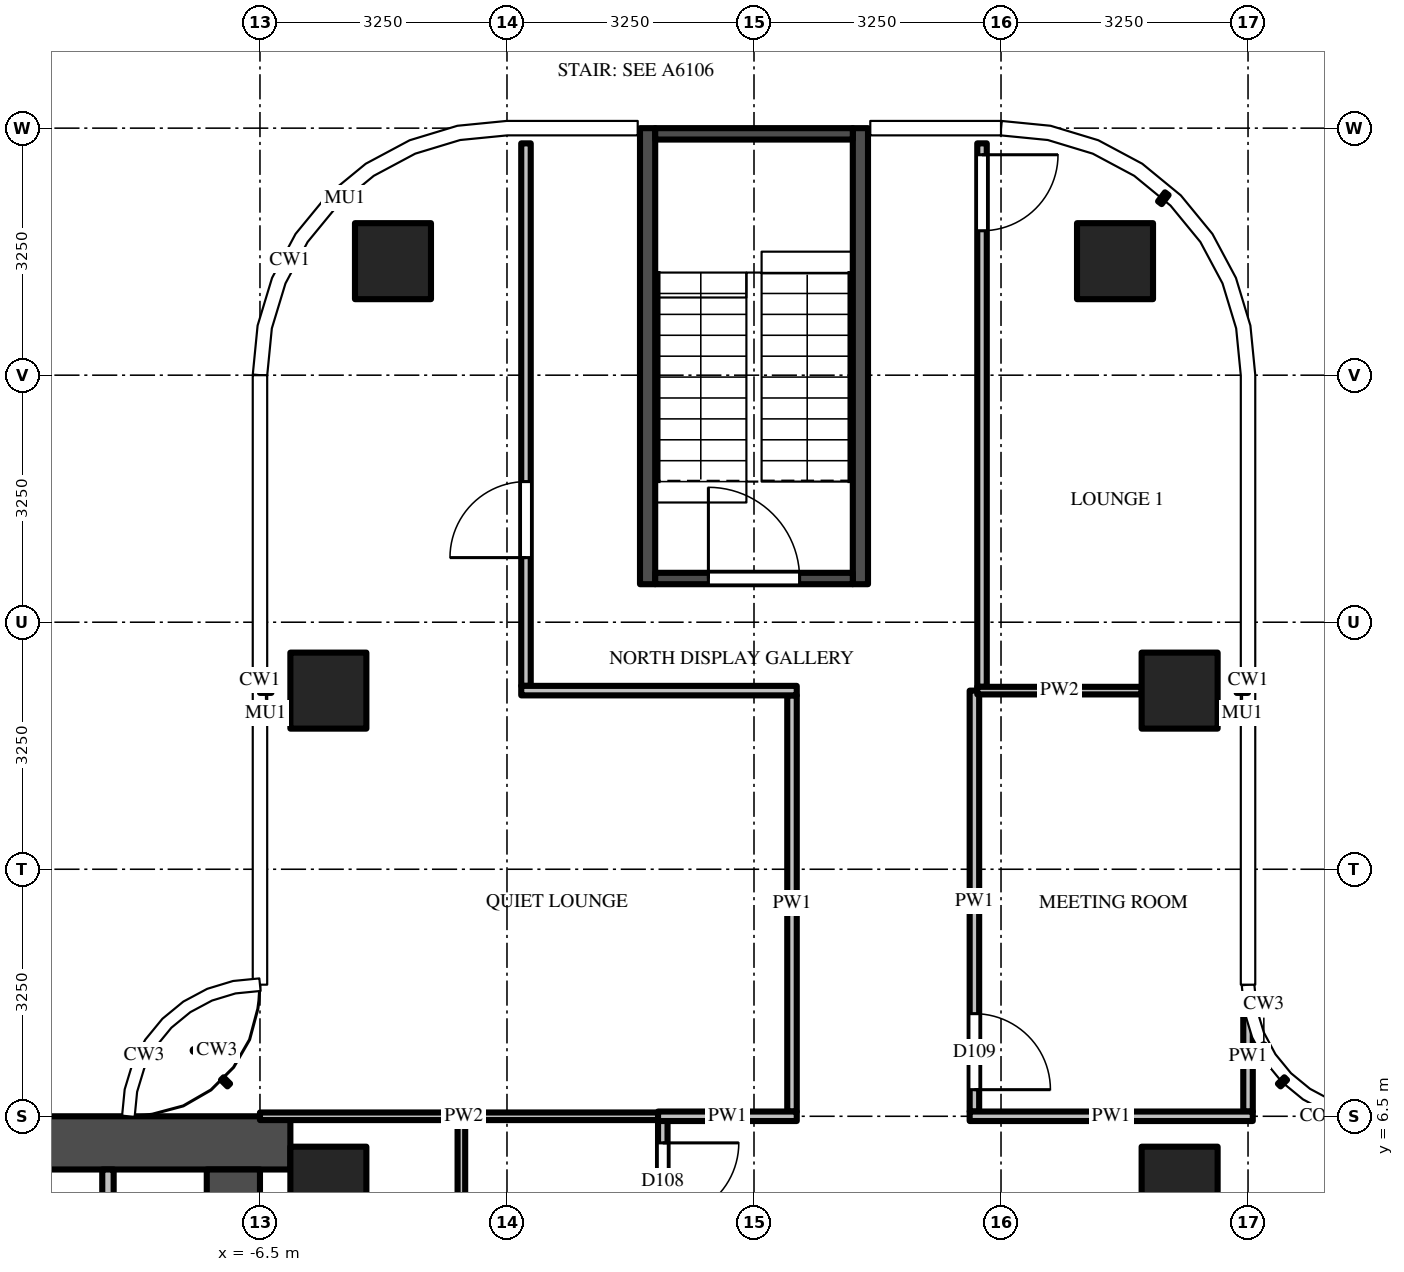
"""IFC4 building model, lengths in metres.
Left out: names, types, materials, properties, quantities, classifications, styles, units other than length and angle.
Written with IfcOpenShell. Run it as: python <this file> out.ifc"""

import sys

from ifc_helpers import new_model, si_unit, direction, frame, frame_2d, origin, origin_2d, place, context, subcontext, project, spatial, polyline, rectangle, outline, extrude, source, transform, mapped, element, fill, save


model = new_model("IFC4")
c1 = context("Model", 3, precision=1e-05, world=origin(), true_north=direction((0.0, 1.0)))
c2 = subcontext(c1, "Body", "Model", "MODEL_VIEW")
j1 = project(units=[si_unit("LENGTHUNIT", "METRE"), si_unit("PLANEANGLEUNIT", "RADIAN")], contexts=[c1])
p1 = place(None, origin())
s1 = spatial("IfcSite", under=j1, at=p1, CompositionType="ELEMENT")
p2 = place(p1, origin())
s2 = spatial("IfcBuilding", under=s1, at=p2, CompositionType="ELEMENT")
p3 = place(p2, frame((0.0, 0.0, 314.5)))
s3 = spatial("IfcBuildingStorey", under=s2, at=p3, CompositionType="ELEMENT", Elevation=314.5)
m1 = source(origin(), c2, "Body", "SweptSolid", [
    extrude(rectangle(XDim=1.0, YDim=1.0, at=origin_2d()), origin(), (0.0, 0.0, 1.0), 3.9),
])
for number, where, z_axis, x_axis in (
    (1, (-5.6, 12.1, 0.0), (0.0, 0.0, 1.0), (1.0, 0.0, 0.0)),
    (2, (-4.75, 17.75, 0.0), (0.0, 0.0, 1.0), (1.0, 0.0, 0.0)),
    (3, (5.6, 12.1, 0.0), (0.0, 0.0, 1.0), (1.0, 0.0, 0.0)),
    (4, (4.75, 17.75, 0.0), (0.0, 0.0, 1.0), (1.0, 0.0, 0.0)),
    (5, (5.6, 5.6, 0.0), (0.0, 0.0, 1.0), (1.0, 0.0, 0.0)),
    (6, (-5.6, 5.6, 0.0), (0.0, 0.0, 1.0), (1.0, 0.0, 0.0)),
):
    element("IfcColumn", number, at=place(p3, frame(where, z_axis=z_axis, x_axis=x_axis)), inside=s3, PredefinedType="COLUMN", context=c2, shape_type="MappedRepresentation", body=[
        mapped(m1, transform((0.0, 0.0, 0.0))),
    ])
m2 = source(origin(), c2, "Body", "SweptSolid", [
    extrude(rectangle(XDim=16.65, YDim=0.7, at=frame_2d((8.325, 0.0))), origin(), (0.0, 0.0, 1.0), 3.7),
])
p4 = place(p3, frame((-6.1, 6.15, 0.0), z_axis=(0.0, 0.0, 1.0), x_axis=(-1.0, 0.0, 0.0)))
e7 = element("IfcWall", 7, at=p4, inside=s3, PredefinedType="SHEAR", context=c2, shape_type="MappedRepresentation", body=[
    mapped(m2, transform((0.0, 0.0, 0.0))),
])
m3 = source(origin(), c2, "Body", "SweptSolid", [
    extrude(rectangle(XDim=9.05, YDim=0.7, at=frame_2d((4.525, 0.0))), origin(), (0.0, 0.0, 1.0), 3.7),
])
p5 = place(p3, frame((-6.85, 5.8, 0.0), z_axis=(0.0, 0.0, 1.0), x_axis=(0.0, -1.0, 0.0)))
e8 = element("IfcWall", 8, at=p5, inside=s3, PredefinedType="SHEAR", context=c2, shape_type="MappedRepresentation", body=[
    mapped(m3, transform((0.0, 0.0, 0.0))),
])
m4 = source(origin(), c2, "Body", "SweptSolid", [
    extrude(rectangle(XDim=1.8, YDim=2.1, at=frame_2d((0.9, 1.05))), frame((0.0, 0.36, 0.0), z_axis=(0.0, -1.0, 0.0), x_axis=(1.0, 0.0, 0.0)), (0.0, 0.0, 1.0), 0.72),
])
p6 = place(p5, frame((3.15, 0.0, 0.0)))
e9 = element("IfcOpeningElement", 9, at=p6, cuts=e8, PredefinedType="OPENING", context=c2, shape_type="MappedRepresentation", body=[
    mapped(m4, transform((0.0, 0.0, 0.0))),
])
m5 = source(origin(), c2, "Body", "SweptSolid", [
    extrude(rectangle(XDim=2.2, YDim=0.15, at=frame_2d((1.1, 0.0))), origin(), (0.0, 0.0, 1.0), 3.7),
])
p7 = place(p3, frame((-8.5, 5.8, 0.0), z_axis=(0.0, 0.0, 1.0), x_axis=(0.0, -1.0, 0.0)))
e10 = element("IfcWall", 10, at=p7, inside=s3, PredefinedType="PARTITIONING", context=c2, shape_type="MappedRepresentation", body=[
    mapped(m5, transform((0.0, 0.0, 0.0))),
])
m6 = source(origin(), c2, "Body", "SweptSolid", [
    extrude(rectangle(XDim=6.0, YDim=0.2, at=frame_2d((3.0, 0.0))), origin(), (0.0, 0.0, 1.0), 3.7),
])
for number, where, z_axis, x_axis in (
    (11, (-1.4, 13.5, 0.0), (0.0, 0.0, 1.0), (0.0, 1.0, 0.0)),
    (12, (1.4, 13.5, 0.0), (0.0, 0.0, 1.0), (0.0, 1.0, 0.0)),
):
    element("IfcWall", number, at=place(p3, frame(where, z_axis=z_axis, x_axis=x_axis)), inside=s3, PredefinedType="SHEAR", context=c2, shape_type="MappedRepresentation", body=[
        mapped(m6, transform((0.0, 0.0, 0.0))),
    ])
m7 = source(origin(), c2, "Body", "SweptSolid", [
    extrude(rectangle(XDim=2.6, YDim=0.15, at=frame_2d((1.3, 0.0))), origin(), (0.0, 0.0, 1.0), 3.7),
])
p8 = place(p3, frame((-1.3, 13.575, 0.0), z_axis=(0.0, 0.0, 1.0), x_axis=(1.0, 0.0, 0.0)))
e13 = element("IfcWall", 13, at=p8, inside=s3, PredefinedType="SHEAR", context=c2, shape_type="MappedRepresentation", body=[
    mapped(m7, transform((0.0, 0.0, 0.0))),
])
m8 = source(origin(), c2, "Body", "SweptSolid", [
    extrude(rectangle(XDim=1.2, YDim=2.1, at=frame_2d((0.6, 1.05))), frame((0.0, 0.085, 0.0), z_axis=(0.0, -1.0, 0.0), x_axis=(1.0, 0.0, 0.0)), (0.0, 0.0, 1.0), 0.17),
])
p9 = place(p8, frame((0.7, 0.0, 0.0)))
e14 = element("IfcOpeningElement", 14, at=p9, cuts=e13, PredefinedType="OPENING", context=c2, shape_type="MappedRepresentation", body=[
    mapped(m8, transform((0.0, 0.0, 0.0))),
])
p10 = place(p3, frame((-1.3, 19.425, 0.0), z_axis=(0.0, 0.0, 1.0), x_axis=(1.0, 0.0, 0.0)))
e15 = element("IfcWall", 15, at=p10, inside=s3, PredefinedType="SHEAR", context=c2, shape_type="MappedRepresentation", body=[
    mapped(m7, transform((0.0, 0.0, 0.0))),
])
p11 = place(p3, origin())
e16 = element("IfcWall", 16, at=p11, inside=s3, PredefinedType="USERDEFINED", context=c2, shape_type="SweptSolid", body=[
    extrude(outline(polyline([(-8.799, 17.044), (-8.292, 18.616), (-7.967, 18.99), (-7.514, 18.597), (-7.758, 18.316), (-8.195, 16.963), (-8.151, 15.967), (-8.114, 15.846), (-8.686, 15.667), (-8.747, 15.862), (-8.799, 17.044)])), origin(), (0.0, 0.0, 1.0), 0.5),
])
m9 = source(origin(), c2, "Body", "SweptSolid", [
    extrude(rectangle(XDim=3.137, YDim=0.1, at=frame_2d((1.569, 0.0))), origin(), (0.0, 0.0, 1.0), 2.997),
])
p12 = place(p3, frame((-3.85, 3.312, 0.0), z_axis=(0.0, 0.0, 1.0), x_axis=(0.0, 1.0, 0.0)))
e17 = element("IfcWall", 17, at=p12, inside=s3, PredefinedType="PARTITIONING", context=c2, shape_type="MappedRepresentation", body=[
    mapped(m9, transform((0.0, 0.0, 0.0))),
])
m10 = source(origin(), c2, "Body", "SweptSolid", [
    extrude(rectangle(XDim=7.137, YDim=0.125, at=frame_2d((3.569, 0.0))), origin(), (0.0, 0.0, 1.0), 2.78),
])
p13 = place(p3, frame((-3.0, 12.163, 0.0), z_axis=(0.0, 0.0, 1.0), x_axis=(0.0, 1.0, 0.0)))
e18 = element("IfcWall", 18, at=p13, inside=s3, PredefinedType="PARTITIONING", context=c2, shape_type="MappedRepresentation", body=[
    mapped(m10, transform((0.0, 0.0, 0.0))),
])
m11 = source(origin(), c2, "Body", "SweptSolid", [
    extrude(rectangle(XDim=1.0, YDim=2.1, at=frame_2d((0.5, 1.05))), frame((0.0, 0.073, 0.0), z_axis=(0.0, -1.0, 0.0), x_axis=(1.0, 0.0, 0.0)), (0.0, 0.0, 1.0), 0.145),
])
p14 = place(p13, frame((1.688, 0.0, 0.0)))
e19 = element("IfcOpeningElement", 19, at=p14, cuts=e18, PredefinedType="OPENING", context=c2, shape_type="MappedRepresentation", body=[
    mapped(m11, transform((0.0, 0.0, 0.0))),
])
m12 = source(origin(), c2, "Body", "SweptSolid", [
    extrude(rectangle(XDim=3.137, YDim=0.125, at=frame_2d((1.569, 0.0))), origin(), (0.0, 0.0, 1.0), 2.997),
])
p15 = place(p3, frame((-1.2, 6.45, 0.0), z_axis=(0.0, 0.0, 1.0), x_axis=(0.0, -1.0, 0.0)))
e20 = element("IfcWall", 20, at=p15, inside=s3, PredefinedType="PARTITIONING", context=c2, shape_type="MappedRepresentation", body=[
    mapped(m12, transform((0.0, 0.0, 0.0))),
])
p16 = place(p15, frame((0.3, 0.0, 0.0)))
e21 = element("IfcOpeningElement", 21, at=p16, cuts=e20, PredefinedType="OPENING", context=c2, shape_type="MappedRepresentation", body=[
    mapped(m11, transform((0.0, 0.0, 0.0))),
])
m13 = source(origin(), c2, "Body", "SweptSolid", [
    extrude(rectangle(XDim=5.475, YDim=0.125, at=frame_2d((2.738, 0.0))), origin(), (0.0, 0.0, 1.0), 2.997),
])
p17 = place(p3, frame((0.5, 12.038, 0.0), z_axis=(0.0, 0.0, 1.0), x_axis=(0.0, -1.0, 0.0)))
e22 = element("IfcWall", 22, at=p17, inside=s3, PredefinedType="PARTITIONING", context=c2, shape_type="MappedRepresentation", body=[
    mapped(m13, transform((0.0, 0.0, 0.0))),
])
m14 = source(origin(), c2, "Body", "SweptSolid", [
    extrude(rectangle(XDim=5.538, YDim=0.125, at=frame_2d((2.769, 0.0))), origin(), (0.0, 0.0, 1.0), 2.997),
])
p18 = place(p3, frame((2.9, 12.1, 0.0), z_axis=(0.0, 0.0, 1.0), x_axis=(0.0, -1.0, 0.0)))
e23 = element("IfcWall", 23, at=p18, inside=s3, PredefinedType="PARTITIONING", context=c2, shape_type="MappedRepresentation", body=[
    mapped(m14, transform((0.0, 0.0, 0.0))),
])
p19 = place(p18, frame((4.25, 0.0, 0.0)))
e24 = element("IfcOpeningElement", 24, at=p19, cuts=e23, PredefinedType="OPENING", context=c2, shape_type="MappedRepresentation", body=[
    mapped(m11, transform((0.0, 0.0, 0.0))),
])
m15 = source(origin(), c2, "Body", "SweptSolid", [
    extrude(rectangle(XDim=7.15, YDim=0.125, at=frame_2d((3.575, 0.0))), origin(), (0.0, 0.0, 1.0), 2.78),
])
p20 = place(p3, frame((3.0, 19.3, 0.0), z_axis=(0.0, 0.0, 1.0), x_axis=(0.0, -1.0, 0.0)))
e25 = element("IfcWall", 25, at=p20, inside=s3, PredefinedType="PARTITIONING", context=c2, shape_type="MappedRepresentation", body=[
    mapped(m15, transform((0.0, 0.0, 0.0))),
])
p21 = place(p20, frame((0.15, 0.0, 0.0)))
e26 = element("IfcOpeningElement", 26, at=p21, cuts=e25, PredefinedType="OPENING", context=c2, shape_type="MappedRepresentation", body=[
    mapped(m11, transform((0.0, 0.0, 0.0))),
])
m16 = source(origin(), c2, "Body", "SweptSolid", [
    extrude(rectangle(XDim=1.469, YDim=0.125, at=frame_2d((0.734, 0.0))), origin(), (0.0, 0.0, 1.0), 3.7),
])
p22 = place(p3, frame((6.5, 6.562, 0.0), z_axis=(0.0, 0.0, 1.0), x_axis=(0.0, 1.0, 0.0)))
e27 = element("IfcWall", 27, at=p22, inside=s3, PredefinedType="PARTITIONING", context=c2, shape_type="MappedRepresentation", body=[
    mapped(m16, transform((0.0, 0.0, 0.0))),
])
m17 = source(origin(), c2, "Body", "SweptSolid", [
    extrude(rectangle(XDim=5.363, YDim=0.1, at=frame_2d((2.681, 0.0))), origin(), (0.0, 0.0, 1.0), 2.78),
])
p23 = place(p3, frame((-6.5, 6.5, 0.0), z_axis=(0.0, 0.0, 1.0), x_axis=(1.0, 0.0, 0.0)))
e28 = element("IfcWall", 28, at=p23, inside=s3, PredefinedType="PARTITIONING", context=c2, shape_type="MappedRepresentation", body=[
    mapped(m17, transform((0.0, 0.0, 0.0))),
])
m18 = source(origin(), c2, "Body", "SweptSolid", [
    extrude(rectangle(XDim=1.825, YDim=0.125, at=frame_2d((0.913, 0.0))), origin(), (0.0, 0.0, 1.0), 3.7),
])
p24 = place(p3, frame((-1.262, 6.5, 0.0), z_axis=(0.0, 0.0, 1.0), x_axis=(1.0, 0.0, 0.0)))
e29 = element("IfcWall", 29, at=p24, inside=s3, PredefinedType="PARTITIONING", context=c2, shape_type="MappedRepresentation", body=[
    mapped(m18, transform((0.0, 0.0, 0.0))),
])
m19 = source(origin(), c2, "Body", "SweptSolid", [
    extrude(rectangle(XDim=3.725, YDim=0.125, at=frame_2d((1.863, 0.0))), origin(), (0.0, 0.0, 1.0), 2.78),
])
p25 = place(p3, frame((2.837, 6.5, 0.0), z_axis=(0.0, 0.0, 1.0), x_axis=(1.0, 0.0, 0.0)))
e30 = element("IfcWall", 30, at=p25, inside=s3, PredefinedType="PARTITIONING", context=c2, shape_type="MappedRepresentation", body=[
    mapped(m19, transform((0.0, 0.0, 0.0))),
])
m20 = source(origin(), c2, "Body", "SweptSolid", [
    extrude(rectangle(XDim=2.163, YDim=0.1, at=frame_2d((1.081, 0.0))), origin(), (0.0, 0.0, 1.0), 2.997),
])
p26 = place(p3, frame((2.938, 12.1, 0.0), z_axis=(0.0, 0.0, 1.0), x_axis=(1.0, 0.0, 0.0)))
e31 = element("IfcWall", 31, at=p26, inside=s3, PredefinedType="PARTITIONING", context=c2, shape_type="MappedRepresentation", body=[
    mapped(m20, transform((0.0, 0.0, 0.0))),
])
m21 = source(origin(), c2, "Body", "SweptSolid", [
    extrude(rectangle(XDim=3.625, YDim=0.125, at=frame_2d((1.812, 0.0))), origin(), (0.0, 0.0, 1.0), 2.997),
])
p27 = place(p3, frame((0.562, 12.1, 0.0), z_axis=(0.0, 0.0, 1.0), x_axis=(-1.0, 0.0, 0.0)))
e32 = element("IfcWall", 32, at=p27, inside=s3, PredefinedType="PARTITIONING", context=c2, shape_type="MappedRepresentation", body=[
    mapped(m21, transform((0.0, 0.0, 0.0))),
])
m22 = source(origin(), c2, "Body", "SweptSolid", [
    extrude(rectangle(XDim=1.2, YDim=2.1, at=frame_2d((0.6, 1.05))), frame((0.0, 0.025, 0.0), z_axis=(0.0, -1.0, 0.0), x_axis=(1.0, 0.0, 0.0)), (0.0, 0.0, 1.0), 0.05),
])
p28 = place(p9, origin())
e33 = element("IfcDoor", 33, at=p28, inside=s3, OperationType="SINGLE_SWING_LEFT", PredefinedType="DOOR", context=c2, shape_type="MappedRepresentation", body=[
    mapped(m22, transform((0.0, 0.0, 0.0))),
])
fill(e14, e33)
m23 = source(origin(), c2, "Body", "SweptSolid", [
    extrude(rectangle(XDim=1.0, YDim=2.1, at=frame_2d((0.5, 1.05))), frame((0.0, 0.025, 0.0), z_axis=(0.0, -1.0, 0.0), x_axis=(1.0, 0.0, 0.0)), (0.0, 0.0, 1.0), 0.05),
])
p29 = place(p16, origin())
e34 = element("IfcDoor", 34, at=p29, inside=s3, OperationType="SINGLE_SWING_LEFT", PredefinedType="DOOR", context=c2, shape_type="MappedRepresentation", body=[
    mapped(m23, transform((0.0, 0.0, 0.0))),
])
fill(e21, e34)
p30 = place(p19, origin())
e35 = element("IfcDoor", 35, at=p30, inside=s3, OperationType="SINGLE_SWING_RIGHT", PredefinedType="DOOR", context=c2, shape_type="MappedRepresentation", body=[
    mapped(m23, transform((0.0, 0.0, 0.0))),
])
fill(e24, e35)
p31 = place(p14, origin())
e36 = element("IfcDoor", 36, at=p31, inside=s3, OperationType="SINGLE_SWING_LEFT", PredefinedType="DOOR", context=c2, shape_type="MappedRepresentation", body=[
    mapped(m23, transform((0.0, 0.0, 0.0))),
])
fill(e19, e36)
p32 = place(p21, origin())
e37 = element("IfcDoor", 37, at=p32, inside=s3, OperationType="SINGLE_SWING_LEFT", PredefinedType="DOOR", context=c2, shape_type="MappedRepresentation", body=[
    mapped(m23, transform((0.0, 0.0, 0.0))),
])
fill(e26, e37)
save(model, sys.argv[1])
